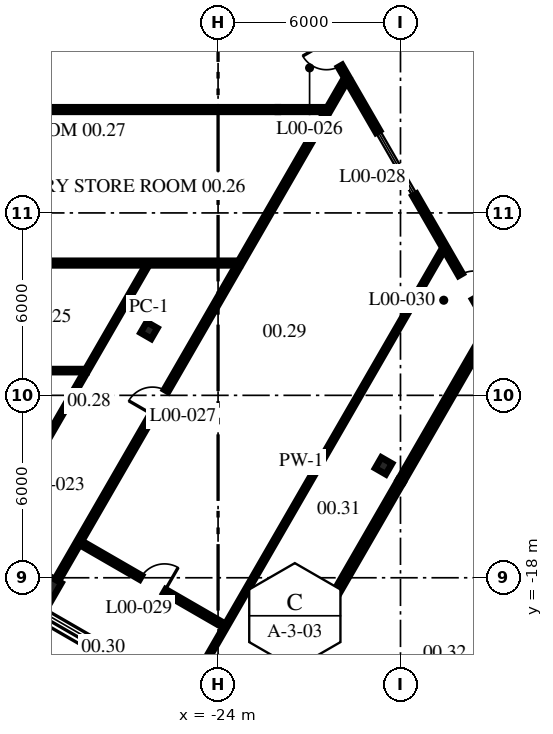
"""IFC4 building model, lengths in metres.
Left out: names, types, materials, properties, quantities, classifications, styles, units other than length and angle.
Written with IfcOpenShell. Run it as: python <this file> out.ifc"""

import sys

from ifc_helpers import new_model, si_unit, direction, frame, frame_2d, origin, origin_2d, place, context, subcontext, project, spatial, rectangle, i_section, extrude, source, transform, mapped, element, fill, save


model = new_model("IFC4")
c1 = context("Model", 3, precision=1e-05, world=origin(), true_north=direction((0.0, 1.0)))
c2 = subcontext(c1, "Body", "Model", "MODEL_VIEW")
j1 = project(units=[si_unit("LENGTHUNIT", "METRE"), si_unit("PLANEANGLEUNIT", "RADIAN")], contexts=[c1])
p1 = place(None, origin())
s1 = spatial("IfcSite", under=j1, at=p1, CompositionType="ELEMENT")
p2 = place(p1, origin())
s2 = spatial("IfcBuilding", under=s1, at=p2, CompositionType="ELEMENT")
p3 = place(p2, origin())
s3 = spatial("IfcBuildingStorey", under=s2, at=p3, CompositionType="ELEMENT", Elevation=0.0)
m1 = source(origin(), c2, "Body", "SweptSolid", [
    extrude(i_section(OverallWidth=0.404, OverallDepth=0.406, WebThickness=0.027, FlangeThickness=0.044, at=origin_2d()), origin(), (0.0, 0.0, 1.0), 7.2),
])
for number, where, z_axis, x_axis in (
    (1, (-26.272, -9.865, -0.2), (0.0, 0.0, 1.0), (0.866, -0.5, 0.0)),
    (2, (-18.556, -14.32, -0.2), (0.0, 0.0, 1.0), (0.866, -0.5, 0.0)),
):
    element("IfcColumn", number, at=place(p3, frame(where, z_axis=z_axis, x_axis=x_axis)), inside=s3, PredefinedType="COLUMN", context=c2, shape_type="MappedRepresentation", body=[
        mapped(m1, transform((0.0, 0.0, 0.0), scale=1.0)),
    ])
m2 = source(origin(), c2, "Body", "SweptSolid", [
    extrude(rectangle(XDim=0.8, YDim=0.8, at=origin_2d()), origin(), (0.0, 0.0, 1.0), 7.2),
])
p4 = place(p3, frame((-29.699, -18.32, -0.2), z_axis=(0.0, 0.0, 1.0), x_axis=(0.866025403784, -0.5, 0.0)))
e3 = element("IfcColumn", 3, at=p4, inside=s3, PredefinedType="COLUMN", context=c2, shape_type="MappedRepresentation", body=[
    mapped(m2, transform((0.0, 0.0, 0.0), scale=1.0)),
])
p5 = place(p3, frame((-20.635, -0.043, 0.0), z_axis=(0.0, 0.0, 1.0), x_axis=(0.500007080889, -0.866021315593, 0.0)))
e4 = element("IfcWall", 4, at=p5, inside=s3, PredefinedType="PARTITIONING", context=c2, shape_type="SweptSolid", body=[
    extrude(rectangle(XDim=11.113, YDim=0.15, at=frame_2d((5.556, 0.0))), origin(), (0.0, 0.0, 1.0), 6.8),
])
p6 = place(p5, frame((0.4, 0.0, 0.0)))
e5 = element("IfcOpeningElement", 5, at=p6, cuts=e4, PredefinedType="OPENING", context=c2, shape_type="SweptSolid", body=[
    extrude(rectangle(XDim=0.9, YDim=2.1, at=frame_2d((0.45, 1.05))), frame((0.0, 0.085, 0.0), z_axis=(0.0, -1.0, 0.0), x_axis=(1.0, 0.0, 0.0)), (0.0, 0.0, 1.0), 0.17),
])
p7 = place(p5, frame((3.792, 0.0, 0.0)))
e6 = element("IfcOpeningElement", 6, at=p7, cuts=e4, PredefinedType="OPENING", context=c2, shape_type="SweptSolid", body=[
    extrude(rectangle(XDim=2.4, YDim=2.4, at=frame_2d((1.2, 1.2))), frame((0.0, 0.085, 0.0), z_axis=(0.0, -1.0, 0.0), x_axis=(1.0, 0.0, 0.0)), (0.0, 0.0, 1.0), 0.17),
])
p8 = place(p5, frame((9.224, 0.0, 0.0)))
e7 = element("IfcOpeningElement", 7, at=p8, cuts=e4, PredefinedType="OPENING", context=c2, shape_type="SweptSolid", body=[
    extrude(rectangle(XDim=0.9, YDim=2.1, at=frame_2d((0.45, 1.05))), frame((0.0, 0.085, 0.0), z_axis=(0.0, -1.0, 0.0), x_axis=(1.0, 0.0, 0.0)), (0.0, 0.0, 1.0), 0.17),
])
p9 = place(p3, frame((-28.526, -16.848, 0.0), z_axis=(0.0, 0.0, 1.0), x_axis=(0.866016423889, -0.500015553313, 0.0)))
e8 = element("IfcWall", 8, at=p9, inside=s3, PredefinedType="PARTITIONING", context=c2, shape_type="SweptSolid", body=[
    extrude(rectangle(XDim=5.48, YDim=0.15, at=frame_2d((2.74, 0.0))), origin(), (0.0, 0.0, 1.0), 6.8),
])
p10 = place(p9, frame((2.29, 0.0, 0.0)))
e9 = element("IfcOpeningElement", 9, at=p10, cuts=e8, PredefinedType="OPENING", context=c2, shape_type="SweptSolid", body=[
    extrude(rectangle(XDim=0.9, YDim=2.1, at=frame_2d((0.45, 1.05))), frame((0.0, 0.085, 0.0), z_axis=(0.0, -1.0, 0.0), x_axis=(1.0, 0.0, 0.0)), (0.0, 0.0, 1.0), 0.17),
])
p11 = place(p3, frame((-43.433, -11.186, 0.0), z_axis=(0.0, 0.0, 1.0), x_axis=(1.0, 0.0, 0.0)))
e10 = element("IfcWall", 10, at=p11, inside=s3, PredefinedType="PARTITIONING", context=c2, shape_type="SweptSolid", body=[
    extrude(rectangle(XDim=15.104, YDim=0.1, at=frame_2d((7.552, 0.0))), origin(), (0.0, 0.0, 1.0), 6.8),
])
p12 = place(p3, frame((-49.56, -7.649, 0.0), z_axis=(0.0, 0.0, 1.0), x_axis=(1.0, 0.0, 0.0)))
e11 = element("IfcWall", 11, at=p12, inside=s3, PredefinedType="PARTITIONING", context=c2, shape_type="SweptSolid", body=[
    extrude(rectangle(XDim=26.276, YDim=0.15, at=frame_2d((13.138, 0.0))), origin(), (0.0, 0.0, 1.0), 6.8),
])
p13 = place(p12, frame((11.15, 0.0, 0.0)))
e12 = element("IfcOpeningElement", 12, at=p13, cuts=e11, PredefinedType="OPENING", context=c2, shape_type="SweptSolid", body=[
    extrude(rectangle(XDim=0.9, YDim=2.1, at=frame_2d((0.45, 1.05))), frame((0.0, 0.085, 0.0), z_axis=(0.0, -1.0, 0.0), x_axis=(1.0, 0.0, 0.0)), (0.0, 0.0, 1.0), 0.17),
])
p14 = place(p3, frame((-51.875, -2.6, 0.0), z_axis=(0.0, 0.0, 1.0), x_axis=(1.0, 0.0, 0.0)))
e13 = element("IfcWall", 13, at=p14, inside=s3, PredefinedType="PARTITIONING", context=c2, shape_type="SweptSolid", body=[
    extrude(rectangle(XDim=29.842, YDim=0.15, at=frame_2d((14.921, 0.0))), origin(), (0.0, 0.0, 1.0), 6.8),
])
p15 = place(p14, frame((15.275, 0.0, 0.0)))
e14 = element("IfcOpeningElement", 14, at=p15, cuts=e13, PredefinedType="OPENING", context=c2, shape_type="SweptSolid", body=[
    extrude(rectangle(XDim=0.9, YDim=2.1, at=frame_2d((0.45, 1.05))), frame((0.0, 0.085, 0.0), z_axis=(0.0, -1.0, 0.0), x_axis=(1.0, 0.0, 0.0)), (0.0, 0.0, 1.0), 0.17),
])
p16 = place(p3, frame((-22.033, -2.6, 0.0), z_axis=(0.0, 0.0, 1.0), x_axis=(1.0, 0.0, 0.0)))
e15 = element("IfcWall", 15, at=p16, inside=s3, PredefinedType="PARTITIONING", context=c2, shape_type="SweptSolid", body=[
    extrude(rectangle(XDim=1.664, YDim=0.15, at=frame_2d((0.832, 0.0))), origin(), (0.0, 0.0, 1.0), 5.858),
])
p17 = place(p3, frame((-22.238, -22.177, 0.0), z_axis=(0.0, 0.0, 1.0), x_axis=(0.500007862672, 0.866020864221, 0.0)))
e16 = element("IfcWall", 16, at=p17, inside=s3, PredefinedType="PARTITIONING", context=c2, shape_type="SweptSolid", body=[
    extrude(rectangle(XDim=8.49, YDim=0.2, at=frame_2d((4.245, 0.0))), origin(), (0.0, 0.0, 1.0), 6.028),
])
p18 = place(p3, frame((-17.993, -14.824, 0.0), z_axis=(0.0, 0.0, 1.0), x_axis=(0.500003463284, 0.866023404247, 0.0)))
e17 = element("IfcWall", 17, at=p18, inside=s3, PredefinedType="PARTITIONING", context=c2, shape_type="SweptSolid", body=[
    extrude(rectangle(XDim=5.891, YDim=0.2, at=frame_2d((2.946, 0.0))), origin(), (0.0, 0.0, 1.0), 6.8),
])
p19 = place(p3, frame((-25.017, -21.79, 0.0), z_axis=(0.0, 0.0, 1.0), x_axis=(0.499997792702, 0.866026678165, 0.0)))
e18 = element("IfcWall", 18, at=p19, inside=s3, PredefinedType="PARTITIONING", context=c2, shape_type="SweptSolid", body=[
    extrude(rectangle(XDim=16.937, YDim=0.1, at=frame_2d((8.469, 0.0))), origin(), (0.0, 0.0, 1.0), 6.8),
])
p20 = place(p3, frame((-29.313, -18.092, 0.0), z_axis=(0.0, 0.0, 1.0), x_axis=(0.499996874182, 0.866027208469, 0.0)))
e19 = element("IfcWall", 19, at=p20, inside=s3, PredefinedType="PARTITIONING", context=c2, shape_type="SweptSolid", body=[
    extrude(rectangle(XDim=19.099, YDim=0.15, at=frame_2d((9.549, 0.0))), origin(), (0.0, 0.0, 1.0), 6.8),
])
p21 = place(p20, frame((6.309, 0.0, 0.0)))
e20 = element("IfcOpeningElement", 20, at=p21, cuts=e19, PredefinedType="OPENING", context=c2, shape_type="SweptSolid", body=[
    extrude(rectangle(XDim=0.9, YDim=2.1, at=frame_2d((0.45, 1.05))), frame((0.0, 0.085, 0.0), z_axis=(0.0, -1.0, 0.0), x_axis=(1.0, 0.0, 0.0)), (0.0, 0.0, 1.0), 0.17),
])
p22 = place(p3, frame((-32.092, -17.705, 0.0), z_axis=(0.0, 0.0, 1.0), x_axis=(0.499985969581, 0.866033504099, 0.0)))
e21 = element("IfcWall", 21, at=p22, inside=s3, PredefinedType="PARTITIONING", context=c2, shape_type="SweptSolid", body=[
    extrude(rectangle(XDim=11.522, YDim=0.1, at=frame_2d((5.761, 0.0))), origin(), (0.0, 0.0, 1.0), 6.8),
])
p23 = place(p22, frame((2.777, 0.0, 0.0)))
e22 = element("IfcOpeningElement", 22, at=p23, cuts=e21, PredefinedType="OPENING", context=c2, shape_type="SweptSolid", body=[
    extrude(rectangle(XDim=1.8, YDim=2.4, at=frame_2d((0.9, 1.2))), frame((0.0, 0.06, 0.0), z_axis=(0.0, -1.0, 0.0), x_axis=(1.0, 0.0, 0.0)), (0.0, 0.0, 1.0), 0.12),
])
p24 = place(p6, origin())
e23 = element("IfcDoor", 23, at=p24, inside=s3, OperationType="SINGLE_SWING_RIGHT", PredefinedType="DOOR", context=c2, shape_type="SweptSolid", body=[
    extrude(rectangle(XDim=0.9, YDim=2.1, at=frame_2d((0.45, 1.05))), frame((0.0, 0.025, 0.0), z_axis=(0.0, -1.0, 0.0), x_axis=(1.0, 0.0, 0.0)), (0.0, 0.0, 1.0), 0.05),
])
fill(e5, e23)
p25 = place(p21, origin())
e24 = element("IfcDoor", 24, at=p25, inside=s3, OperationType="SINGLE_SWING_LEFT", PredefinedType="DOOR", context=c2, shape_type="SweptSolid", body=[
    extrude(rectangle(XDim=0.9, YDim=2.1, at=frame_2d((0.45, 1.05))), frame((0.0, 0.025, 0.0), z_axis=(0.0, -1.0, 0.0), x_axis=(1.0, 0.0, 0.0)), (0.0, 0.0, 1.0), 0.05),
])
fill(e20, e24)
p26 = place(p7, origin())
e25 = element("IfcDoor", 25, at=p26, inside=s3, OperationType="ROLLINGUP", PredefinedType="DOOR", context=c2, shape_type="SweptSolid", body=[
    extrude(rectangle(XDim=2.4, YDim=2.4, at=frame_2d((1.2, 1.2))), frame((0.0, 0.025, 0.0), z_axis=(0.0, -1.0, 0.0), x_axis=(1.0, 0.0, 0.0)), (0.0, 0.0, 1.0), 0.05),
])
fill(e6, e25)
p27 = place(p10, origin())
e26 = element("IfcDoor", 26, at=p27, inside=s3, OperationType="SINGLE_SWING_LEFT", PredefinedType="DOOR", context=c2, shape_type="SweptSolid", body=[
    extrude(rectangle(XDim=0.9, YDim=2.1, at=frame_2d((0.45, 1.05))), frame((0.0, 0.025, 0.0), z_axis=(0.0, -1.0, 0.0), x_axis=(1.0, 0.0, 0.0)), (0.0, 0.0, 1.0), 0.05),
])
fill(e9, e26)
p28 = place(p8, origin())
e27 = element("IfcDoor", 27, at=p28, inside=s3, OperationType="SINGLE_SWING_LEFT", PredefinedType="DOOR", context=c2, shape_type="SweptSolid", body=[
    extrude(rectangle(XDim=0.9, YDim=2.1, at=frame_2d((0.45, 1.05))), frame((0.0, 0.025, 0.0), z_axis=(0.0, -1.0, 0.0), x_axis=(1.0, 0.0, 0.0)), (0.0, 0.0, 1.0), 0.05),
])
fill(e7, e27)
save(model, sys.argv[1])
